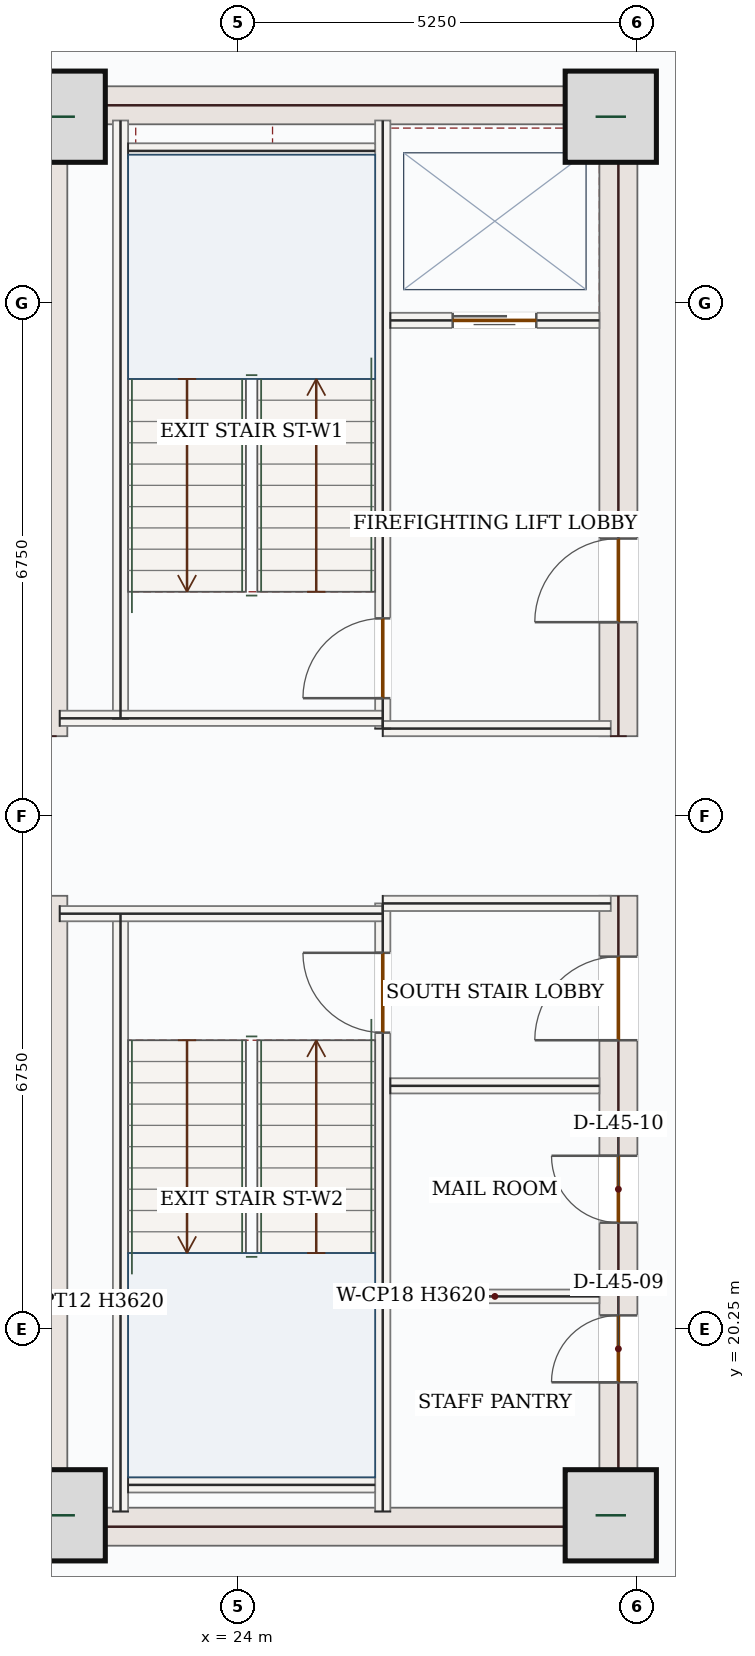
"""IFC4 building model, lengths in metres.
Left out: names, types, materials, properties, quantities, classifications, styles, units other than length and angle.
Written with IfcOpenShell. Run it as: python <this file> out.ifc"""

import sys

from ifc_helpers import new_model, si_unit, direction, frame, frame_2d, origin, origin_2d, place, context, subcontext, project, spatial, rectangle, extrude, source, transform, mapped, element, fill, save


model = new_model("IFC4")
c1 = context("Model", 3, precision=1e-05, world=origin(), true_north=direction((0.0, 1.0)))
c2 = subcontext(c1, "Body", "Model", "MODEL_VIEW")
j1 = project(units=[si_unit("LENGTHUNIT", "METRE"), si_unit("PLANEANGLEUNIT", "RADIAN")], contexts=[c1])
p1 = place(None, origin())
s1 = spatial("IfcSite", under=j1, at=p1, CompositionType="ELEMENT")
p2 = place(p1, origin())
s2 = spatial("IfcBuilding", under=s1, at=p2, CompositionType="ELEMENT")
p3 = place(p2, frame((0.0, 0.0, 194.1)))
s3 = spatial("IfcBuildingStorey", under=s2, at=p3, CompositionType="ELEMENT", Elevation=194.1)
m1 = source(origin(), c2, "Body", "SweptSolid", [
    extrude(rectangle(XDim=8.55, YDim=0.5, at=frame_2d((4.275, 0.0))), origin(), (0.0, 0.0, 1.0), 3.62),
])
for number, where, z_axis, x_axis in (
    (1, (21.5, 17.4, 0.0), (0.0, 0.0, 1.0), (0.0, 1.0, 0.0)),
    (2, (21.5, 28.05, 0.0), (0.0, 0.0, 1.0), (0.0, 1.0, 0.0)),
):
    element("IfcWall", number, at=place(p3, frame(where, z_axis=z_axis, x_axis=x_axis)), inside=s3, PredefinedType="SHEAR", context=c2, shape_type="MappedRepresentation", body=[
        mapped(m1, transform((0.0, 0.0, 0.0), x_axis=(1.0, 0.0, 0.0), y_axis=(0.0, 1.0, 0.0), z_axis=(0.0, 0.0, 1.0), scale=1.0)),
    ])
p4 = place(p3, frame((29.0, 17.4, 0.0), z_axis=(0.0, 0.0, 1.0), x_axis=(0.0, 1.0, 0.0)))
e3 = element("IfcWall", 3, at=p4, inside=s3, PredefinedType="SHEAR", context=c2, shape_type="SweptSolid", body=[
    extrude(rectangle(XDim=8.55, YDim=0.5, at=frame_2d((4.275, 0.0))), origin(), (0.0, 0.0, 1.0), 3.62),
])
p5 = place(p4, frame((6.65, 0.0, 0.0)))
e4 = element("IfcOpeningElement", 4, at=p5, cuts=e3, PredefinedType="OPENING", context=c2, shape_type="SweptSolid", body=[
    extrude(rectangle(XDim=1.1, YDim=2.2, at=frame_2d((0.55, 1.1))), frame((0.0, 0.26, 0.0), z_axis=(0.0, -1.0, 0.0), x_axis=(1.0, 0.0, 0.0)), (0.0, 0.0, 1.0), 0.52),
])
p6 = place(p4, frame((2.15, 0.0, 0.0)))
e5 = element("IfcOpeningElement", 5, at=p6, cuts=e3, PredefinedType="OPENING", context=c2, shape_type="SweptSolid", body=[
    extrude(rectangle(XDim=0.88, YDim=2.1, at=frame_2d((0.44, 1.05))), frame((0.0, 0.26, 0.0), z_axis=(0.0, -1.0, 0.0), x_axis=(1.0, 0.0, 0.0)), (0.0, 0.0, 1.0), 0.52),
])
p7 = place(p4, frame((4.25, 0.0, 0.0)))
e6 = element("IfcOpeningElement", 6, at=p7, cuts=e3, PredefinedType="OPENING", context=c2, shape_type="SweptSolid", body=[
    extrude(rectangle(XDim=0.88, YDim=2.1, at=frame_2d((0.44, 1.05))), frame((0.0, 0.26, 0.0), z_axis=(0.0, -1.0, 0.0), x_axis=(1.0, 0.0, 0.0)), (0.0, 0.0, 1.0), 0.52),
])
p8 = place(p3, frame((29.0, 28.05, 0.0), z_axis=(0.0, 0.0, 1.0), x_axis=(0.0, 1.0, 0.0)))
e7 = element("IfcWall", 7, at=p8, inside=s3, PredefinedType="SHEAR", context=c2, shape_type="SweptSolid", body=[
    extrude(rectangle(XDim=8.55, YDim=0.5, at=frame_2d((4.275, 0.0))), origin(), (0.0, 0.0, 1.0), 3.62),
])
p9 = place(p8, frame((1.5, 0.0, 0.0)))
e8 = element("IfcOpeningElement", 8, at=p9, cuts=e7, PredefinedType="OPENING", context=c2, shape_type="SweptSolid", body=[
    extrude(rectangle(XDim=1.1, YDim=2.2, at=frame_2d((0.55, 1.1))), frame((0.0, 0.26, 0.0), z_axis=(0.0, -1.0, 0.0), x_axis=(1.0, 0.0, 0.0)), (0.0, 0.0, 1.0), 0.52),
])
m2 = source(origin(), c2, "Body", "SweptSolid", [
    extrude(rectangle(XDim=7.0, YDim=0.5, at=frame_2d((3.5, 0.0))), origin(), (0.0, 0.0, 1.0), 3.62),
])
for number, where, z_axis, x_axis in (
    (9, (21.75, 17.65, 0.0), (0.0, 0.0, 1.0), (1.0, 0.0, 0.0)),
    (10, (21.75, 36.35, 0.0), (0.0, 0.0, 1.0), (1.0, 0.0, 0.0)),
):
    element("IfcWall", number, at=place(p3, frame(where, z_axis=z_axis, x_axis=x_axis)), inside=s3, PredefinedType="SHEAR", context=c2, shape_type="MappedRepresentation", body=[
        mapped(m2, transform((0.0, 0.0, 0.0), x_axis=(1.0, 0.0, 0.0), y_axis=(0.0, 1.0, 0.0), z_axis=(0.0, 0.0, 1.0), scale=1.0)),
    ])
m3 = source(origin(), c2, "Body", "SweptSolid", [
    extrude(rectangle(XDim=1.2, YDim=1.2, at=origin_2d()), origin(), (0.0, 0.0, 1.0), 3.9),
])
for number, where, z_axis, x_axis in (
    (11, (21.65, 17.8, 0.0), (0.0, 0.0, 1.0), (1.0, 0.0, 0.0)),
    (12, (28.9, 17.8, 0.0), (0.0, 0.0, 1.0), (1.0, 0.0, 0.0)),
    (13, (21.65, 36.2, 0.0), (0.0, 0.0, 1.0), (1.0, 0.0, 0.0)),
    (14, (28.9, 36.2, 0.0), (0.0, 0.0, 1.0), (1.0, 0.0, 0.0)),
):
    element("IfcColumn", number, at=place(p3, frame(where, z_axis=z_axis, x_axis=x_axis)), inside=s3, PredefinedType="COLUMN", context=c2, shape_type="MappedRepresentation", body=[
        mapped(m3, transform((0.0, 0.0, 0.0), x_axis=(1.0, 0.0, 0.0), y_axis=(0.0, 1.0, 0.0), z_axis=(0.0, 0.0, 1.0), scale=1.0)),
    ])
m4 = source(origin(), c2, "Body", "SweptSolid", [
    extrude(rectangle(XDim=5.258, YDim=0.28, at=frame_2d((2.629, 0.0))), origin(), (0.0, 0.0, 1.0), 3.62),
])
p10 = place(p3, frame((18.94, 35.542, 0.0), z_axis=(0.0, 0.0, 1.0), x_axis=(0.707106781187, 0.707106781187, 0.0)))
e15 = element("IfcWall", 15, at=p10, inside=s3, PredefinedType="SOLIDWALL", context=c2, shape_type="MappedRepresentation", body=[
    mapped(m4, transform((0.0, 0.0, 0.0), x_axis=(1.0, 0.0, 0.0), y_axis=(0.0, 1.0, 0.0), z_axis=(0.0, 0.0, 1.0), scale=1.0)),
])
m5 = source(origin(), c2, "Body", "SweptSolid", [
    extrude(rectangle(XDim=7.87, YDim=0.2, at=frame_2d((3.935, 0.0))), origin(), (0.0, 0.0, 1.0), 3.62),
])
for number, where, z_axis, x_axis in (
    (16, (22.45, 17.85, 0.0), (0.0, 0.0, 1.0), (0.0, 1.0, 0.0)),
    (17, (22.45, 28.28, 0.0), (0.0, 0.0, 1.0), (0.0, 1.0, 0.0)),
):
    element("IfcWall", number, at=place(p3, frame(where, z_axis=z_axis, x_axis=x_axis)), inside=s3, PredefinedType="SOLIDWALL", context=c2, shape_type="MappedRepresentation", body=[
        mapped(m5, transform((0.0, 0.0, 0.0), x_axis=(1.0, 0.0, 0.0), y_axis=(0.0, 1.0, 0.0), z_axis=(0.0, 0.0, 1.0), scale=1.0)),
    ])
p11 = place(p3, frame((25.9, 17.85, 0.0), z_axis=(0.0, 0.0, 1.0), x_axis=(0.0, 1.0, 0.0)))
e18 = element("IfcWall", 18, at=p11, inside=s3, PredefinedType="SOLIDWALL", context=c2, shape_type="SweptSolid", body=[
    extrude(rectangle(XDim=8.0, YDim=0.2, at=frame_2d((4.0, 0.0))), origin(), (0.0, 0.0, 1.0), 3.62),
])
p12 = place(p11, frame((6.3, 0.0, 0.0)))
e19 = element("IfcOpeningElement", 19, at=p12, cuts=e18, PredefinedType="OPENING", context=c2, shape_type="SweptSolid", body=[
    extrude(rectangle(XDim=1.05, YDim=2.15, at=frame_2d((0.525, 1.075))), frame((0.0, 0.11, 0.0), z_axis=(0.0, -1.0, 0.0), x_axis=(1.0, 0.0, 0.0)), (0.0, 0.0, 1.0), 0.22),
])
p13 = place(p3, frame((25.9, 28.15, 0.0), z_axis=(0.0, 0.0, 1.0), x_axis=(0.0, 1.0, 0.0)))
e20 = element("IfcWall", 20, at=p13, inside=s3, PredefinedType="SOLIDWALL", context=c2, shape_type="SweptSolid", body=[
    extrude(rectangle(XDim=8.0, YDim=0.2, at=frame_2d((4.0, 0.0))), origin(), (0.0, 0.0, 1.0), 3.62),
])
p14 = place(p13, frame((0.4, 0.0, 0.0)))
e21 = element("IfcOpeningElement", 21, at=p14, cuts=e20, PredefinedType="OPENING", context=c2, shape_type="SweptSolid", body=[
    extrude(rectangle(XDim=1.05, YDim=2.15, at=frame_2d((0.525, 1.075))), frame((0.0, 0.11, 0.0), z_axis=(0.0, -1.0, 0.0), x_axis=(1.0, 0.0, 0.0)), (0.0, 0.0, 1.0), 0.22),
])
m6 = source(origin(), c2, "Body", "SweptSolid", [
    extrude(rectangle(XDim=4.25, YDim=0.2, at=frame_2d((2.125, 0.0))), origin(), (0.0, 0.0, 1.0), 3.62),
])
p15 = place(p3, frame((21.65, 25.715, 0.0), z_axis=(0.0, 0.0, 1.0), x_axis=(1.0, 0.0, 0.0)))
e22 = element("IfcWall", 22, at=p15, inside=s3, PredefinedType="SOLIDWALL", context=c2, shape_type="MappedRepresentation", body=[
    mapped(m6, transform((0.0, 0.0, 0.0), x_axis=(1.0, 0.0, 0.0), y_axis=(0.0, 1.0, 0.0), z_axis=(0.0, 0.0, 1.0), scale=1.0)),
])
m7 = source(origin(), c2, "Body", "SweptSolid", [
    extrude(rectangle(XDim=3.0, YDim=0.2, at=frame_2d((1.5, 0.0))), origin(), (0.0, 0.0, 1.0), 3.62),
])
p16 = place(p3, frame((25.9, 25.85, 0.0), z_axis=(0.0, 0.0, 1.0), x_axis=(1.0, 0.0, 0.0)))
e23 = element("IfcWall", 23, at=p16, inside=s3, PredefinedType="SOLIDWALL", context=c2, shape_type="MappedRepresentation", body=[
    mapped(m7, transform((0.0, 0.0, 0.0), x_axis=(1.0, 0.0, 0.0), y_axis=(0.0, 1.0, 0.0), z_axis=(0.0, 0.0, 1.0), scale=1.0)),
])
p17 = place(p3, frame((21.65, 28.285, 0.0), z_axis=(0.0, 0.0, 1.0), x_axis=(1.0, 0.0, 0.0)))
e24 = element("IfcWall", 24, at=p17, inside=s3, PredefinedType="SOLIDWALL", context=c2, shape_type="MappedRepresentation", body=[
    mapped(m6, transform((0.0, 0.0, 0.0), x_axis=(1.0, 0.0, 0.0), y_axis=(0.0, 1.0, 0.0), z_axis=(0.0, 0.0, 1.0), scale=1.0)),
])
p18 = place(p3, frame((25.9, 28.15, 0.0), z_axis=(0.0, 0.0, 1.0), x_axis=(1.0, 0.0, 0.0)))
e25 = element("IfcWall", 25, at=p18, inside=s3, PredefinedType="SOLIDWALL", context=c2, shape_type="MappedRepresentation", body=[
    mapped(m7, transform((0.0, 0.0, 0.0), x_axis=(1.0, 0.0, 0.0), y_axis=(0.0, 1.0, 0.0), z_axis=(0.0, 0.0, 1.0), scale=1.0)),
])
m8 = source(origin(), c2, "Body", "SweptSolid", [
    extrude(rectangle(XDim=3.25, YDim=0.2, at=frame_2d((1.625, 0.0))), origin(), (0.0, 0.0, 1.0), 3.62),
])
for number, where, z_axis, x_axis in (
    (26, (22.55, 35.75, 0.0), (0.0, 0.0, 1.0), (1.0, 0.0, 0.0)),
    (27, (22.55, 18.2, 0.0), (0.0, 0.0, 1.0), (1.0, 0.0, 0.0)),
):
    element("IfcWall", number, at=place(p3, frame(where, z_axis=z_axis, x_axis=x_axis)), inside=s3, PredefinedType="SOLIDWALL", context=c2, shape_type="MappedRepresentation", body=[
        mapped(m8, transform((0.0, 0.0, 0.0), x_axis=(1.0, 0.0, 0.0), y_axis=(0.0, 1.0, 0.0), z_axis=(0.0, 0.0, 1.0), scale=1.0)),
    ])
p19 = place(p3, frame((26.0, 33.52, 0.0), z_axis=(0.0, 0.0, 1.0), x_axis=(1.0, 0.0, 0.0)))
e28 = element("IfcWall", 28, at=p19, inside=s3, PredefinedType="SOLIDWALL", context=c2, shape_type="SweptSolid", body=[
    extrude(rectangle(XDim=2.75, YDim=0.2, at=frame_2d((1.375, 0.0))), origin(), (0.0, 0.0, 1.0), 3.62),
])
p20 = place(p19, frame((0.82, 0.0, 0.0)))
e29 = element("IfcOpeningElement", 29, at=p20, cuts=e28, PredefinedType="OPENING", context=c2, shape_type="SweptSolid", body=[
    extrude(rectangle(XDim=1.1, YDim=2.15, at=frame_2d((0.55, 1.075))), frame((0.0, 0.11, 0.0), z_axis=(0.0, -1.0, 0.0), x_axis=(1.0, 0.0, 0.0)), (0.0, 0.0, 1.0), 0.22),
])
m9 = source(origin(), c2, "Body", "SweptSolid", [
    extrude(rectangle(XDim=2.75, YDim=0.2, at=frame_2d((1.375, 0.0))), origin(), (0.0, 0.0, 1.0), 3.62),
])
p21 = place(p3, frame((26.0, 23.45, 0.0), z_axis=(0.0, 0.0, 1.0), x_axis=(1.0, 0.0, 0.0)))
e30 = element("IfcWall", 30, at=p21, inside=s3, PredefinedType="SOLIDWALL", context=c2, shape_type="MappedRepresentation", body=[
    mapped(m9, transform((0.0, 0.0, 0.0), x_axis=(1.0, 0.0, 0.0), y_axis=(0.0, 1.0, 0.0), z_axis=(0.0, 0.0, 1.0), scale=1.0)),
])
m10 = source(origin(), c2, "Body", "SweptSolid", [
    extrude(rectangle(XDim=2.75, YDim=0.18, at=frame_2d((1.375, 0.0))), origin(), (0.0, 0.0, 1.0), 3.62),
])
p22 = place(p3, frame((26.0, 20.68, 0.0), z_axis=(0.0, 0.0, 1.0), x_axis=(1.0, 0.0, 0.0)))
e31 = element("IfcWall", 31, at=p22, inside=s3, PredefinedType="PARTITIONING", context=c2, shape_type="MappedRepresentation", body=[
    mapped(m10, transform((0.0, 0.0, 0.0), x_axis=(1.0, 0.0, 0.0), y_axis=(0.0, 1.0, 0.0), z_axis=(0.0, 0.0, 1.0), scale=1.0)),
])
m11 = source(origin(), c2, "Body", "SweptSolid", [
    extrude(rectangle(XDim=1.05, YDim=2.15, at=frame_2d((0.525, 1.075))), frame((0.0, 0.025, 0.0), z_axis=(0.0, -1.0, 0.0), x_axis=(1.0, 0.0, 0.0)), (0.0, 0.0, 1.0), 0.05),
])
p23 = place(p14, origin())
e32 = element("IfcDoor", 32, at=p23, inside=s3, OperationType="SINGLE_SWING_LEFT", PredefinedType="DOOR", context=c2, shape_type="MappedRepresentation", body=[
    mapped(m11, transform((0.0, 0.0, 0.0), x_axis=(1.0, 0.0, 0.0), y_axis=(0.0, 1.0, 0.0), z_axis=(0.0, 0.0, 1.0), scale=1.0)),
])
fill(e21, e32)
p24 = place(p12, origin())
e33 = element("IfcDoor", 33, at=p24, inside=s3, OperationType="SINGLE_SWING_RIGHT", PredefinedType="DOOR", context=c2, shape_type="MappedRepresentation", body=[
    mapped(m11, transform((0.0, 0.0, 0.0), x_axis=(1.0, 0.0, 0.0), y_axis=(0.0, 1.0, 0.0), z_axis=(0.0, 0.0, 1.0), scale=1.0)),
])
fill(e19, e33)
m12 = source(origin(), c2, "Body", "SweptSolid", [
    extrude(rectangle(XDim=1.1, YDim=2.15, at=frame_2d((0.55, 1.075))), frame((0.0, 0.025, 0.0), z_axis=(0.0, -1.0, 0.0), x_axis=(1.0, 0.0, 0.0)), (0.0, 0.0, 1.0), 0.05),
])
p25 = place(p20, origin())
e34 = element("IfcDoor", 34, at=p25, inside=s3, OperationType="DOUBLE_DOOR_SLIDING", PredefinedType="DOOR", context=c2, shape_type="MappedRepresentation", body=[
    mapped(m12, transform((0.0, 0.0, 0.0), x_axis=(1.0, 0.0, 0.0), y_axis=(0.0, 1.0, 0.0), z_axis=(0.0, 0.0, 1.0), scale=1.0)),
])
fill(e29, e34)
m13 = source(origin(), c2, "Body", "SweptSolid", [
    extrude(rectangle(XDim=1.1, YDim=2.2, at=frame_2d((0.55, 1.1))), frame((0.0, 0.025, 0.0), z_axis=(0.0, -1.0, 0.0), x_axis=(1.0, 0.0, 0.0)), (0.0, 0.0, 1.0), 0.05),
])
p26 = place(p9, origin())
e35 = element("IfcDoor", 35, at=p26, inside=s3, OperationType="SINGLE_SWING_LEFT", PredefinedType="DOOR", context=c2, shape_type="MappedRepresentation", body=[
    mapped(m13, transform((0.0, 0.0, 0.0), x_axis=(1.0, 0.0, 0.0), y_axis=(0.0, 1.0, 0.0), z_axis=(0.0, 0.0, 1.0), scale=1.0)),
])
fill(e8, e35)
p27 = place(p5, origin())
e36 = element("IfcDoor", 36, at=p27, inside=s3, OperationType="SINGLE_SWING_LEFT", PredefinedType="DOOR", context=c2, shape_type="MappedRepresentation", body=[
    mapped(m13, transform((0.0, 0.0, 0.0), x_axis=(1.0, 0.0, 0.0), y_axis=(0.0, 1.0, 0.0), z_axis=(0.0, 0.0, 1.0), scale=1.0)),
])
fill(e4, e36)
m14 = source(origin(), c2, "Body", "SweptSolid", [
    extrude(rectangle(XDim=0.88, YDim=2.1, at=frame_2d((0.44, 1.05))), frame((0.0, 0.025, 0.0), z_axis=(0.0, -1.0, 0.0), x_axis=(1.0, 0.0, 0.0)), (0.0, 0.0, 1.0), 0.05),
])
p28 = place(p6, origin())
e37 = element("IfcDoor", 37, at=p28, inside=s3, OperationType="SINGLE_SWING_LEFT", PredefinedType="DOOR", context=c2, shape_type="MappedRepresentation", body=[
    mapped(m14, transform((0.0, 0.0, 0.0), x_axis=(1.0, 0.0, 0.0), y_axis=(0.0, 1.0, 0.0), z_axis=(0.0, 0.0, 1.0), scale=1.0)),
])
fill(e5, e37)
p29 = place(p7, origin())
e38 = element("IfcDoor", 38, at=p29, inside=s3, OperationType="SINGLE_SWING_RIGHT", PredefinedType="DOOR", context=c2, shape_type="MappedRepresentation", body=[
    mapped(m14, transform((0.0, 0.0, 0.0), x_axis=(1.0, 0.0, 0.0), y_axis=(0.0, 1.0, 0.0), z_axis=(0.0, 0.0, 1.0), scale=1.0)),
])
fill(e6, e38)
save(model, sys.argv[1])
